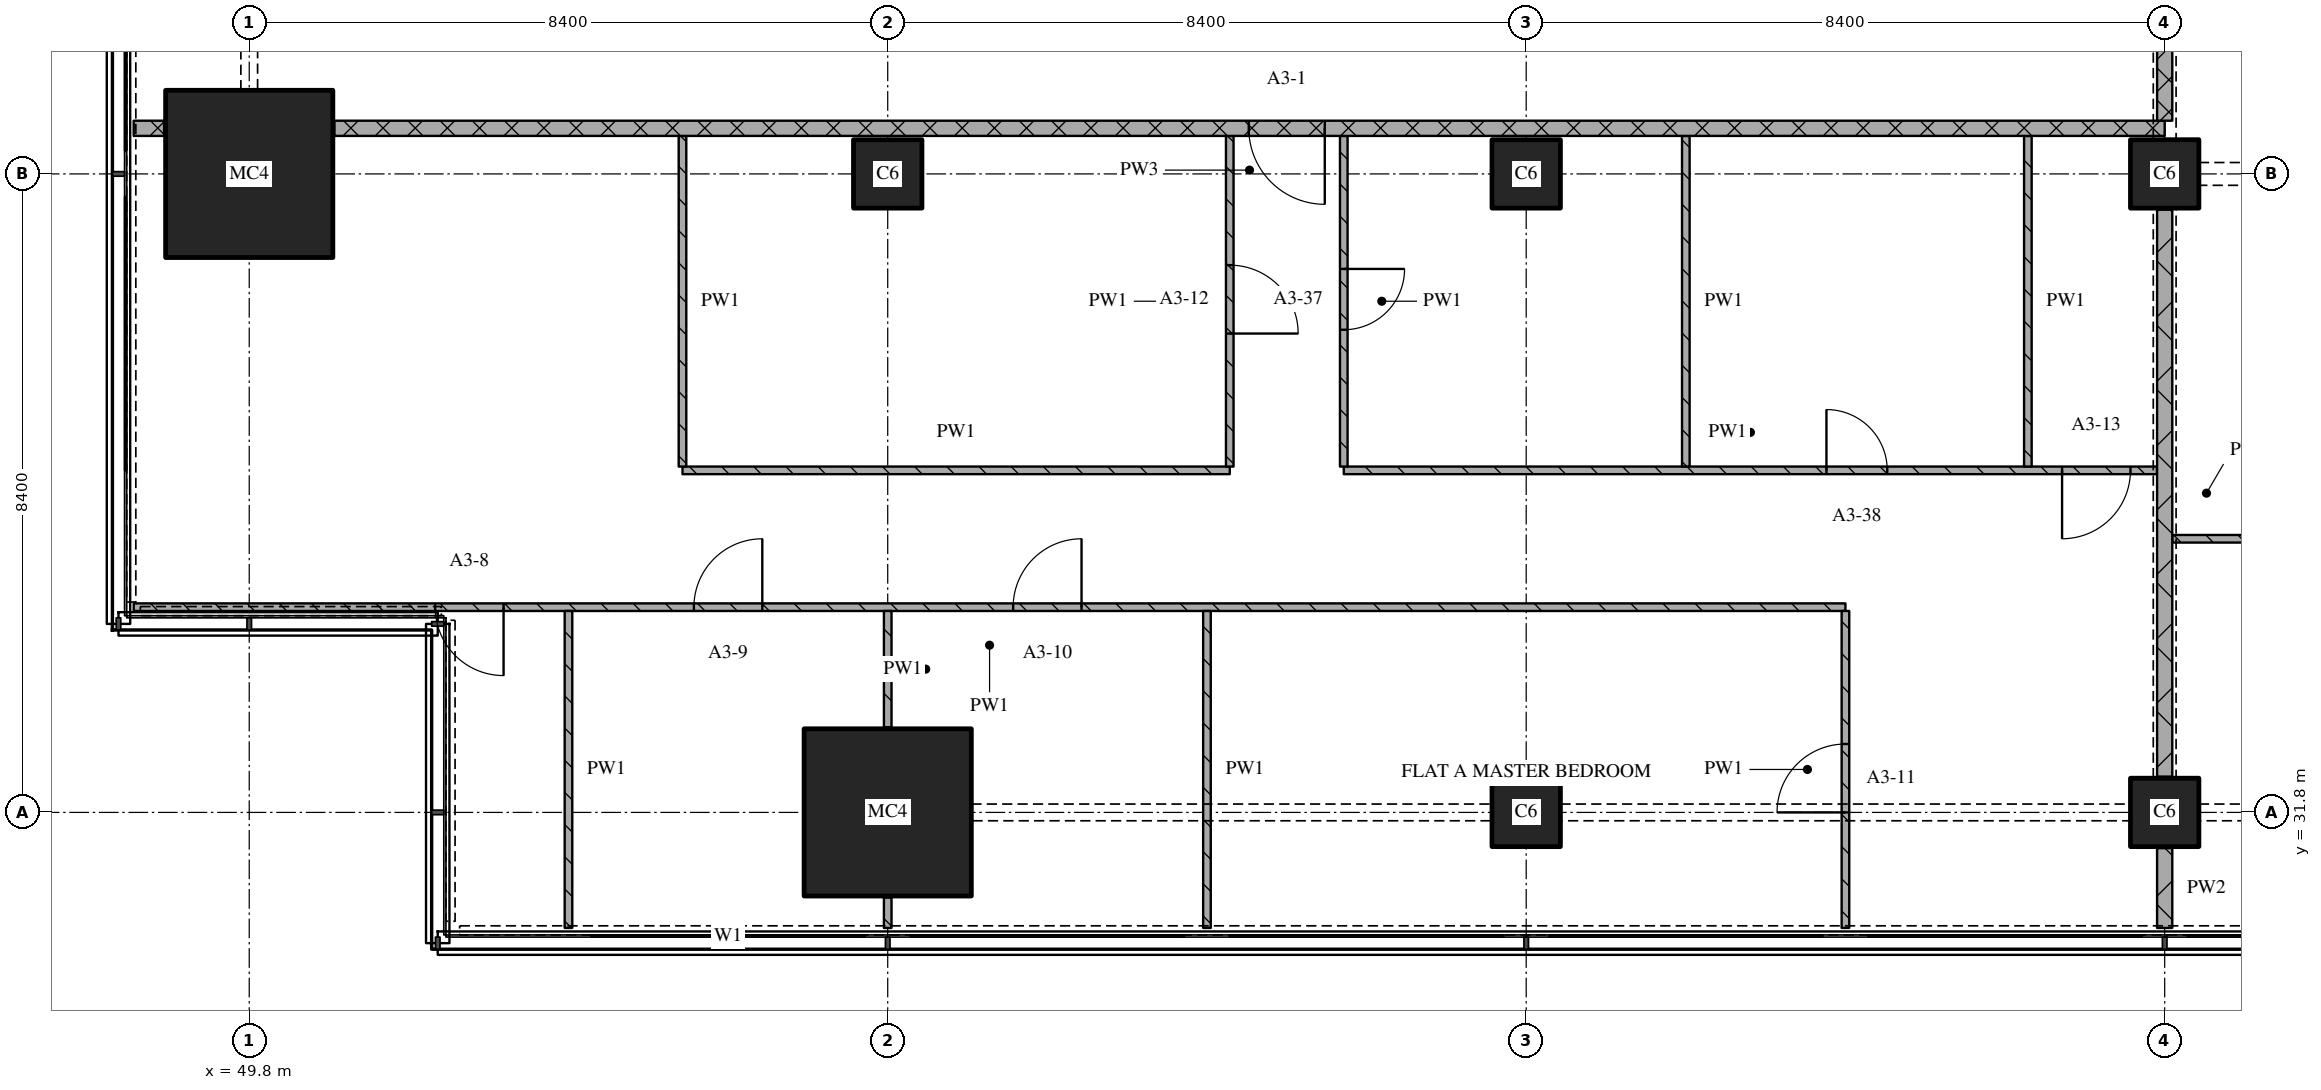
"""IFC4 building model, lengths in metres.
Left out: names, types, materials, properties, quantities, classifications, styles, units other than length and angle.
Written with IfcOpenShell. Run it as: python <this file> out.ifc"""

import sys

from ifc_helpers import new_model, si_unit, direction, frame, frame_2d, origin, origin_2d, place, context, subcontext, project, spatial, rectangle, extrude, element, fill, save


model = new_model("IFC4")
c1 = context("Model", 3, precision=1e-05, world=origin(), true_north=direction((0.0, 1.0)))
c2 = subcontext(c1, "Body", "Model", "MODEL_VIEW")
j1 = project(units=[si_unit("LENGTHUNIT", "METRE"), si_unit("PLANEANGLEUNIT", "RADIAN")], contexts=[c1])
p1 = place(None, origin())
s1 = spatial("IfcSite", under=j1, at=p1, CompositionType="ELEMENT")
p2 = place(p1, origin())
s2 = spatial("IfcBuilding", under=s1, at=p2, CompositionType="ELEMENT")
p3 = place(p2, frame((0.0, 0.0, 62.4)))
s3 = spatial("IfcBuildingStorey", under=s2, at=p3, CompositionType="ELEMENT", Elevation=62.4)
for number, where, z_axis, x_axis in (
    (1, (49.8, 40.2, 0.0), (0.0, 0.0, 1.0), (1.0, 0.0, 0.0)),
    (2, (58.2, 31.8, 0.0), (0.0, 0.0, 1.0), (1.0, 0.0, 0.0)),
):
    element("IfcColumn", number, at=place(p3, frame(where, z_axis=z_axis, x_axis=x_axis)), inside=s3, PredefinedType="COLUMN", context=c2, shape_type="SweptSolid", body=[
        extrude(rectangle(XDim=2.2, YDim=2.2, at=origin_2d()), origin(), (0.0, 0.0, 1.0), 3.6),
    ])
for number, where, z_axis, x_axis in (
    (3, (58.2, 40.2, 0.0), (0.0, 0.0, 1.0), (1.0, 0.0, 0.0)),
    (4, (66.6, 31.8, 0.0), (0.0, 0.0, 1.0), (1.0, 0.0, 0.0)),
    (5, (66.6, 40.2, 0.0), (0.0, 0.0, 1.0), (1.0, 0.0, 0.0)),
    (6, (75.0, 31.8, 0.0), (0.0, 0.0, 1.0), (1.0, 0.0, 0.0)),
    (7, (75.0, 40.2, 0.0), (0.0, 0.0, 1.0), (1.0, 0.0, 0.0)),
):
    element("IfcColumn", number, at=place(p3, frame(where, z_axis=z_axis, x_axis=x_axis)), inside=s3, PredefinedType="COLUMN", context=c2, shape_type="SweptSolid", body=[
        extrude(rectangle(XDim=0.9, YDim=0.9, at=origin_2d()), origin(), (0.0, 0.0, 1.0), 3.6),
    ])
p4 = place(p3, frame((70.8, 34.5, 0.0), z_axis=(0.0, 0.0, 1.0), x_axis=(-1.0, 0.0, 0.0)))
e8 = element("IfcWall", 8, at=p4, inside=s3, PredefinedType="PARTITIONING", context=c2, shape_type="SweptSolid", body=[
    extrude(rectangle(XDim=22.52, YDim=0.1, at=frame_2d((11.26, 0.0))), origin(), (0.0, 0.0, 1.0), 3.32),
])
p5 = place(p4, frame((10.05, 0.0, 0.0)))
e9 = element("IfcOpeningElement", 9, at=p5, cuts=e8, PredefinedType="OPENING", context=c2, shape_type="SweptSolid", body=[
    extrude(rectangle(XDim=0.9, YDim=2.1, at=frame_2d((0.45, 1.05))), frame((0.0, 0.06, 0.0), z_axis=(0.0, -1.0, 0.0), x_axis=(1.0, 0.0, 0.0)), (0.0, 0.0, 1.0), 0.12),
])
p6 = place(p4, frame((14.25, 0.0, 0.0)))
e10 = element("IfcOpeningElement", 10, at=p6, cuts=e8, PredefinedType="OPENING", context=c2, shape_type="SweptSolid", body=[
    extrude(rectangle(XDim=0.9, YDim=2.1, at=frame_2d((0.45, 1.05))), frame((0.0, 0.06, 0.0), z_axis=(0.0, -1.0, 0.0), x_axis=(1.0, 0.0, 0.0)), (0.0, 0.0, 1.0), 0.12),
])
p7 = place(p4, frame((17.654, 0.0, 0.0)))
e11 = element("IfcOpeningElement", 11, at=p7, cuts=e8, PredefinedType="OPENING", context=c2, shape_type="SweptSolid", body=[
    extrude(rectangle(XDim=0.9, YDim=2.1, at=frame_2d((0.45, 1.05))), frame((0.0, 0.06, 0.0), z_axis=(0.0, -1.0, 0.0), x_axis=(1.0, 0.0, 0.0)), (0.0, 0.0, 1.0), 0.12),
])
p8 = place(p3, frame((96.0, 35.4, 0.0), z_axis=(0.0, 0.0, 1.0), x_axis=(-1.0, 0.0, 0.0)))
e12 = element("IfcWall", 12, at=p8, inside=s3, PredefinedType="PARTITIONING", context=c2, shape_type="SweptSolid", body=[
    extrude(rectangle(XDim=20.9, YDim=0.1, at=frame_2d((10.45, 0.0))), origin(), (0.0, 0.0, 1.0), 3.32),
])
p9 = place(p8, frame((12.15, 0.0, 0.0)))
e13 = element("IfcOpeningElement", 13, at=p9, cuts=e12, PredefinedType="OPENING", context=c2, shape_type="SweptSolid", body=[
    extrude(rectangle(XDim=0.9, YDim=2.1, at=frame_2d((0.45, 1.05))), frame((0.0, 0.06, 0.0), z_axis=(0.0, -1.0, 0.0), x_axis=(1.0, 0.0, 0.0)), (0.0, 0.0, 1.0), 0.12),
])
p10 = place(p8, frame((18.45, 0.0, 0.0)))
e14 = element("IfcOpeningElement", 14, at=p10, cuts=e12, PredefinedType="OPENING", context=c2, shape_type="SweptSolid", body=[
    extrude(rectangle(XDim=0.9, YDim=2.1, at=frame_2d((0.45, 1.05))), frame((0.0, 0.06, 0.0), z_axis=(0.0, -1.0, 0.0), x_axis=(1.0, 0.0, 0.0)), (0.0, 0.0, 1.0), 0.12),
])
p11 = place(p3, frame((55.5, 36.3, 0.0), z_axis=(0.0, 0.0, 1.0), x_axis=(1.0, 0.0, 0.0)))
e15 = element("IfcWall", 15, at=p11, inside=s3, PredefinedType="PARTITIONING", context=c2, shape_type="SweptSolid", body=[
    extrude(rectangle(XDim=7.2, YDim=0.1, at=frame_2d((3.6, 0.0))), origin(), (0.0, 0.0, 1.0), 3.32),
])
p12 = place(p3, frame((64.2, 36.3, 0.0), z_axis=(0.0, 0.0, 1.0), x_axis=(1.0, 0.0, 0.0)))
e16 = element("IfcWall", 16, at=p12, inside=s3, PredefinedType="PARTITIONING", context=c2, shape_type="SweptSolid", body=[
    extrude(rectangle(XDim=10.7, YDim=0.1, at=frame_2d((5.35, 0.0))), origin(), (0.0, 0.0, 1.0), 3.32),
])
p13 = place(p12, frame((6.35, 0.0, 0.0)))
e17 = element("IfcOpeningElement", 17, at=p13, cuts=e16, PredefinedType="OPENING", context=c2, shape_type="SweptSolid", body=[
    extrude(rectangle(XDim=0.8, YDim=2.1, at=frame_2d((0.4, 1.05))), frame((0.0, 0.06, 0.0), z_axis=(0.0, -1.0, 0.0), x_axis=(1.0, 0.0, 0.0)), (0.0, 0.0, 1.0), 0.12),
])
p14 = place(p12, frame((9.45, 0.0, 0.0)))
e18 = element("IfcOpeningElement", 18, at=p14, cuts=e16, PredefinedType="OPENING", context=c2, shape_type="SweptSolid", body=[
    extrude(rectangle(XDim=0.9, YDim=2.1, at=frame_2d((0.45, 1.05))), frame((0.0, 0.06, 0.0), z_axis=(0.0, -1.0, 0.0), x_axis=(1.0, 0.0, 0.0)), (0.0, 0.0, 1.0), 0.12),
])
p15 = place(p3, frame((48.28, 40.8, 0.0), z_axis=(0.0, 0.0, 1.0), x_axis=(1.0, 0.0, 0.0)))
e19 = element("IfcWall", 19, at=p15, inside=s3, PredefinedType="PARTITIONING", context=c2, shape_type="SweptSolid", body=[
    extrude(rectangle(XDim=0.4, YDim=0.2, at=frame_2d((0.2, 0.0))), origin(), (0.0, 0.0, 1.0), 3.32),
])
p16 = place(p3, frame((75.0, 40.8, 0.0), z_axis=(0.0, 0.0, 1.0), x_axis=(-1.0, 0.0, 0.0)))
e20 = element("IfcWall", 20, at=p16, inside=s3, PredefinedType="PARTITIONING", context=c2, shape_type="SweptSolid", body=[
    extrude(rectangle(XDim=24.08, YDim=0.2, at=frame_2d((12.04, 0.0))), origin(), (0.0, 0.0, 1.0), 3.32),
])
p17 = place(p16, frame((11.05, 0.0, 0.0)))
e21 = element("IfcOpeningElement", 21, at=p17, cuts=e20, PredefinedType="OPENING", context=c2, shape_type="SweptSolid", body=[
    extrude(rectangle(XDim=1.0, YDim=2.1, at=frame_2d((0.5, 1.05))), frame((0.0, 0.11, 0.0), z_axis=(0.0, -1.0, 0.0), x_axis=(1.0, 0.0, 0.0)), (0.0, 0.0, 1.0), 0.22),
])
p18 = place(p3, frame((54.0, 34.45, 0.0), z_axis=(0.0, 0.0, 1.0), x_axis=(0.0, -1.0, 0.0)))
e22 = element("IfcWall", 22, at=p18, inside=s3, PredefinedType="PARTITIONING", context=c2, shape_type="SweptSolid", body=[
    extrude(rectangle(XDim=4.17, YDim=0.1, at=frame_2d((2.085, 0.0))), origin(), (0.0, 0.0, 1.0), 3.32),
])
p19 = place(p3, frame((55.5, 40.7, 0.0), z_axis=(0.0, 0.0, 1.0), x_axis=(0.0, -1.0, 0.0)))
e23 = element("IfcWall", 23, at=p19, inside=s3, PredefinedType="PARTITIONING", context=c2, shape_type="SweptSolid", body=[
    extrude(rectangle(XDim=4.35, YDim=0.1, at=frame_2d((2.175, 0.0))), origin(), (0.0, 0.0, 1.0), 3.32),
])
p20 = place(p3, frame((58.2, 30.68, 0.0), z_axis=(0.0, 0.0, 1.0), x_axis=(0.0, -1.0, 0.0)))
e24 = element("IfcWall", 24, at=p20, inside=s3, PredefinedType="PARTITIONING", context=c2, shape_type="SweptSolid", body=[
    extrude(rectangle(XDim=0.4, YDim=0.1, at=frame_2d((0.2, 0.0))), origin(), (0.0, 0.0, 1.0), 3.32),
])
p21 = place(p3, frame((58.2, 34.45, 0.0), z_axis=(0.0, 0.0, 1.0), x_axis=(0.0, -1.0, 0.0)))
e25 = element("IfcWall", 25, at=p21, inside=s3, PredefinedType="PARTITIONING", context=c2, shape_type="SweptSolid", body=[
    extrude(rectangle(XDim=1.53, YDim=0.1, at=frame_2d((0.765, 0.0))), origin(), (0.0, 0.0, 1.0), 3.32),
])
p22 = place(p3, frame((62.4, 34.45, 0.0), z_axis=(0.0, 0.0, 1.0), x_axis=(0.0, -1.0, 0.0)))
e26 = element("IfcWall", 26, at=p22, inside=s3, PredefinedType="PARTITIONING", context=c2, shape_type="SweptSolid", body=[
    extrude(rectangle(XDim=4.17, YDim=0.1, at=frame_2d((2.085, 0.0))), origin(), (0.0, 0.0, 1.0), 3.32),
])
p23 = place(p3, frame((62.7, 36.35, 0.0), z_axis=(0.0, 0.0, 1.0), x_axis=(0.0, 1.0, 0.0)))
e27 = element("IfcWall", 27, at=p23, inside=s3, PredefinedType="PARTITIONING", context=c2, shape_type="SweptSolid", body=[
    extrude(rectangle(XDim=4.35, YDim=0.1, at=frame_2d((2.175, 0.0))), origin(), (0.0, 0.0, 1.0), 3.32),
])
p24 = place(p23, frame((1.75, 0.0, 0.0)))
e28 = element("IfcOpeningElement", 28, at=p24, cuts=e27, PredefinedType="OPENING", context=c2, shape_type="SweptSolid", body=[
    extrude(rectangle(XDim=0.9, YDim=2.1, at=frame_2d((0.45, 1.05))), frame((0.0, 0.06, 0.0), z_axis=(0.0, -1.0, 0.0), x_axis=(1.0, 0.0, 0.0)), (0.0, 0.0, 1.0), 0.12),
])
p25 = place(p3, frame((64.2, 40.7, 0.0), z_axis=(0.0, 0.0, 1.0), x_axis=(0.0, -1.0, 0.0)))
e29 = element("IfcWall", 29, at=p25, inside=s3, PredefinedType="PARTITIONING", context=c2, shape_type="SweptSolid", body=[
    extrude(rectangle(XDim=4.35, YDim=0.1, at=frame_2d((2.175, 0.0))), origin(), (0.0, 0.0, 1.0), 3.32),
])
p26 = place(p25, frame((1.75, 0.0, 0.0)))
e30 = element("IfcOpeningElement", 30, at=p26, cuts=e29, PredefinedType="OPENING", context=c2, shape_type="SweptSolid", body=[
    extrude(rectangle(XDim=0.8, YDim=2.1, at=frame_2d((0.4, 1.05))), frame((0.0, 0.06, 0.0), z_axis=(0.0, -1.0, 0.0), x_axis=(1.0, 0.0, 0.0)), (0.0, 0.0, 1.0), 0.12),
])
p27 = place(p3, frame((68.7, 40.7, 0.0), z_axis=(0.0, 0.0, 1.0), x_axis=(0.0, -1.0, 0.0)))
e31 = element("IfcWall", 31, at=p27, inside=s3, PredefinedType="PARTITIONING", context=c2, shape_type="SweptSolid", body=[
    extrude(rectangle(XDim=4.35, YDim=0.1, at=frame_2d((2.175, 0.0))), origin(), (0.0, 0.0, 1.0), 3.32),
])
p28 = place(p3, frame((70.8, 30.28, 0.0), z_axis=(0.0, 0.0, 1.0), x_axis=(0.0, 1.0, 0.0)))
e32 = element("IfcWall", 32, at=p28, inside=s3, PredefinedType="PARTITIONING", context=c2, shape_type="SweptSolid", body=[
    extrude(rectangle(XDim=4.17, YDim=0.1, at=frame_2d((2.085, 0.0))), origin(), (0.0, 0.0, 1.0), 3.32),
])
p29 = place(p28, frame((1.52, 0.0, 0.0)))
e33 = element("IfcOpeningElement", 33, at=p29, cuts=e32, PredefinedType="OPENING", context=c2, shape_type="SweptSolid", body=[
    extrude(rectangle(XDim=0.9, YDim=2.1, at=frame_2d((0.45, 1.05))), frame((0.0, 0.06, 0.0), z_axis=(0.0, -1.0, 0.0), x_axis=(1.0, 0.0, 0.0)), (0.0, 0.0, 1.0), 0.12),
])
p30 = place(p3, frame((73.2, 40.7, 0.0), z_axis=(0.0, 0.0, 1.0), x_axis=(0.0, -1.0, 0.0)))
e34 = element("IfcWall", 34, at=p30, inside=s3, PredefinedType="PARTITIONING", context=c2, shape_type="SweptSolid", body=[
    extrude(rectangle(XDim=4.35, YDim=0.1, at=frame_2d((2.175, 0.0))), origin(), (0.0, 0.0, 1.0), 3.32),
])
p31 = place(p3, frame((75.0, 43.1, 0.0), z_axis=(0.0, 0.0, 1.0), x_axis=(0.0, -1.0, 0.0)))
e35 = element("IfcWall", 35, at=p31, inside=s3, PredefinedType="PARTITIONING", context=c2, shape_type="SweptSolid", body=[
    extrude(rectangle(XDim=2.2, YDim=0.2, at=frame_2d((1.1, 0.0))), origin(), (0.0, 0.0, 1.0), 2.43),
])
p32 = place(p3, frame((75.0, 31.33, 0.0), z_axis=(0.0, 0.0, 1.0), x_axis=(0.0, -1.0, 0.0)))
e36 = element("IfcWall", 36, at=p32, inside=s3, PredefinedType="PARTITIONING", context=c2, shape_type="SweptSolid", body=[
    extrude(rectangle(XDim=1.05, YDim=0.2, at=frame_2d((0.525, 0.0))), origin(), (0.0, 0.0, 1.0), 3.32),
])
p33 = place(p3, frame((75.0, 39.73, 0.0), z_axis=(0.0, 0.0, 1.0), x_axis=(0.0, -1.0, 0.0)))
e37 = element("IfcWall", 37, at=p33, inside=s3, PredefinedType="PARTITIONING", context=c2, shape_type="SweptSolid", body=[
    extrude(rectangle(XDim=7.46, YDim=0.2, at=frame_2d((3.73, 0.0))), origin(), (0.0, 0.0, 1.0), 2.83),
])
p34 = place(p5, origin())
e38 = element("IfcDoor", 38, at=p34, inside=s3, OperationType="SINGLE_SWING_RIGHT", PredefinedType="DOOR", context=c2, shape_type="SweptSolid", body=[
    extrude(rectangle(XDim=0.9, YDim=2.1, at=frame_2d((0.45, 1.05))), frame((0.0, 0.025, 0.0), z_axis=(0.0, -1.0, 0.0), x_axis=(1.0, 0.0, 0.0)), (0.0, 0.0, 1.0), 0.05),
])
fill(e9, e38)
p35 = place(p6, origin())
e39 = element("IfcDoor", 39, at=p35, inside=s3, OperationType="SINGLE_SWING_RIGHT", PredefinedType="DOOR", context=c2, shape_type="SweptSolid", body=[
    extrude(rectangle(XDim=0.9, YDim=2.1, at=frame_2d((0.45, 1.05))), frame((0.0, 0.025, 0.0), z_axis=(0.0, -1.0, 0.0), x_axis=(1.0, 0.0, 0.0)), (0.0, 0.0, 1.0), 0.05),
])
fill(e10, e39)
p36 = place(p7, origin())
e40 = element("IfcDoor", 40, at=p36, inside=s3, OperationType="SINGLE_SWING_LEFT", PredefinedType="DOOR", context=c2, shape_type="SweptSolid", body=[
    extrude(rectangle(XDim=0.9, YDim=2.1, at=frame_2d((0.45, 1.05))), frame((0.0, 0.025, 0.0), z_axis=(0.0, -1.0, 0.0), x_axis=(1.0, 0.0, 0.0)), (0.0, 0.0, 1.0), 0.05),
])
fill(e11, e40)
p37 = place(p13, origin())
e41 = element("IfcDoor", 41, at=p37, inside=s3, OperationType="SINGLE_SWING_LEFT", PredefinedType="DOOR", context=c2, shape_type="SweptSolid", body=[
    extrude(rectangle(XDim=0.8, YDim=2.1, at=frame_2d((0.4, 1.05))), frame((0.0, 0.025, 0.0), z_axis=(0.0, -1.0, 0.0), x_axis=(1.0, 0.0, 0.0)), (0.0, 0.0, 1.0), 0.05),
])
fill(e17, e41)
p38 = place(p14, origin())
e42 = element("IfcDoor", 42, at=p38, inside=s3, OperationType="SINGLE_SWING_RIGHT", PredefinedType="DOOR", context=c2, shape_type="SweptSolid", body=[
    extrude(rectangle(XDim=0.9, YDim=2.1, at=frame_2d((0.45, 1.05))), frame((0.0, 0.025, 0.0), z_axis=(0.0, -1.0, 0.0), x_axis=(1.0, 0.0, 0.0)), (0.0, 0.0, 1.0), 0.05),
])
fill(e18, e42)
p39 = place(p17, origin())
e43 = element("IfcDoor", 43, at=p39, inside=s3, OperationType="SINGLE_SWING_LEFT", PredefinedType="DOOR", context=c2, shape_type="SweptSolid", body=[
    extrude(rectangle(XDim=1.0, YDim=2.1, at=frame_2d((0.5, 1.05))), frame((0.0, 0.025, 0.0), z_axis=(0.0, -1.0, 0.0), x_axis=(1.0, 0.0, 0.0)), (0.0, 0.0, 1.0), 0.05),
])
fill(e21, e43)
p40 = place(p24, origin())
e44 = element("IfcDoor", 44, at=p40, inside=s3, OperationType="SINGLE_SWING_RIGHT", PredefinedType="DOOR", context=c2, shape_type="SweptSolid", body=[
    extrude(rectangle(XDim=0.9, YDim=2.1, at=frame_2d((0.45, 1.05))), frame((0.0, 0.025, 0.0), z_axis=(0.0, -1.0, 0.0), x_axis=(1.0, 0.0, 0.0)), (0.0, 0.0, 1.0), 0.05),
])
fill(e28, e44)
p41 = place(p26, origin())
e45 = element("IfcDoor", 45, at=p41, inside=s3, OperationType="SINGLE_SWING_LEFT", PredefinedType="DOOR", context=c2, shape_type="SweptSolid", body=[
    extrude(rectangle(XDim=0.8, YDim=2.1, at=frame_2d((0.4, 1.05))), frame((0.0, 0.025, 0.0), z_axis=(0.0, -1.0, 0.0), x_axis=(1.0, 0.0, 0.0)), (0.0, 0.0, 1.0), 0.05),
])
fill(e30, e45)
p42 = place(p29, origin())
e46 = element("IfcDoor", 46, at=p42, inside=s3, OperationType="SINGLE_SWING_LEFT", PredefinedType="DOOR", context=c2, shape_type="SweptSolid", body=[
    extrude(rectangle(XDim=0.9, YDim=2.1, at=frame_2d((0.45, 1.05))), frame((0.0, 0.025, 0.0), z_axis=(0.0, -1.0, 0.0), x_axis=(1.0, 0.0, 0.0)), (0.0, 0.0, 1.0), 0.05),
])
fill(e33, e46)
save(model, sys.argv[1])
